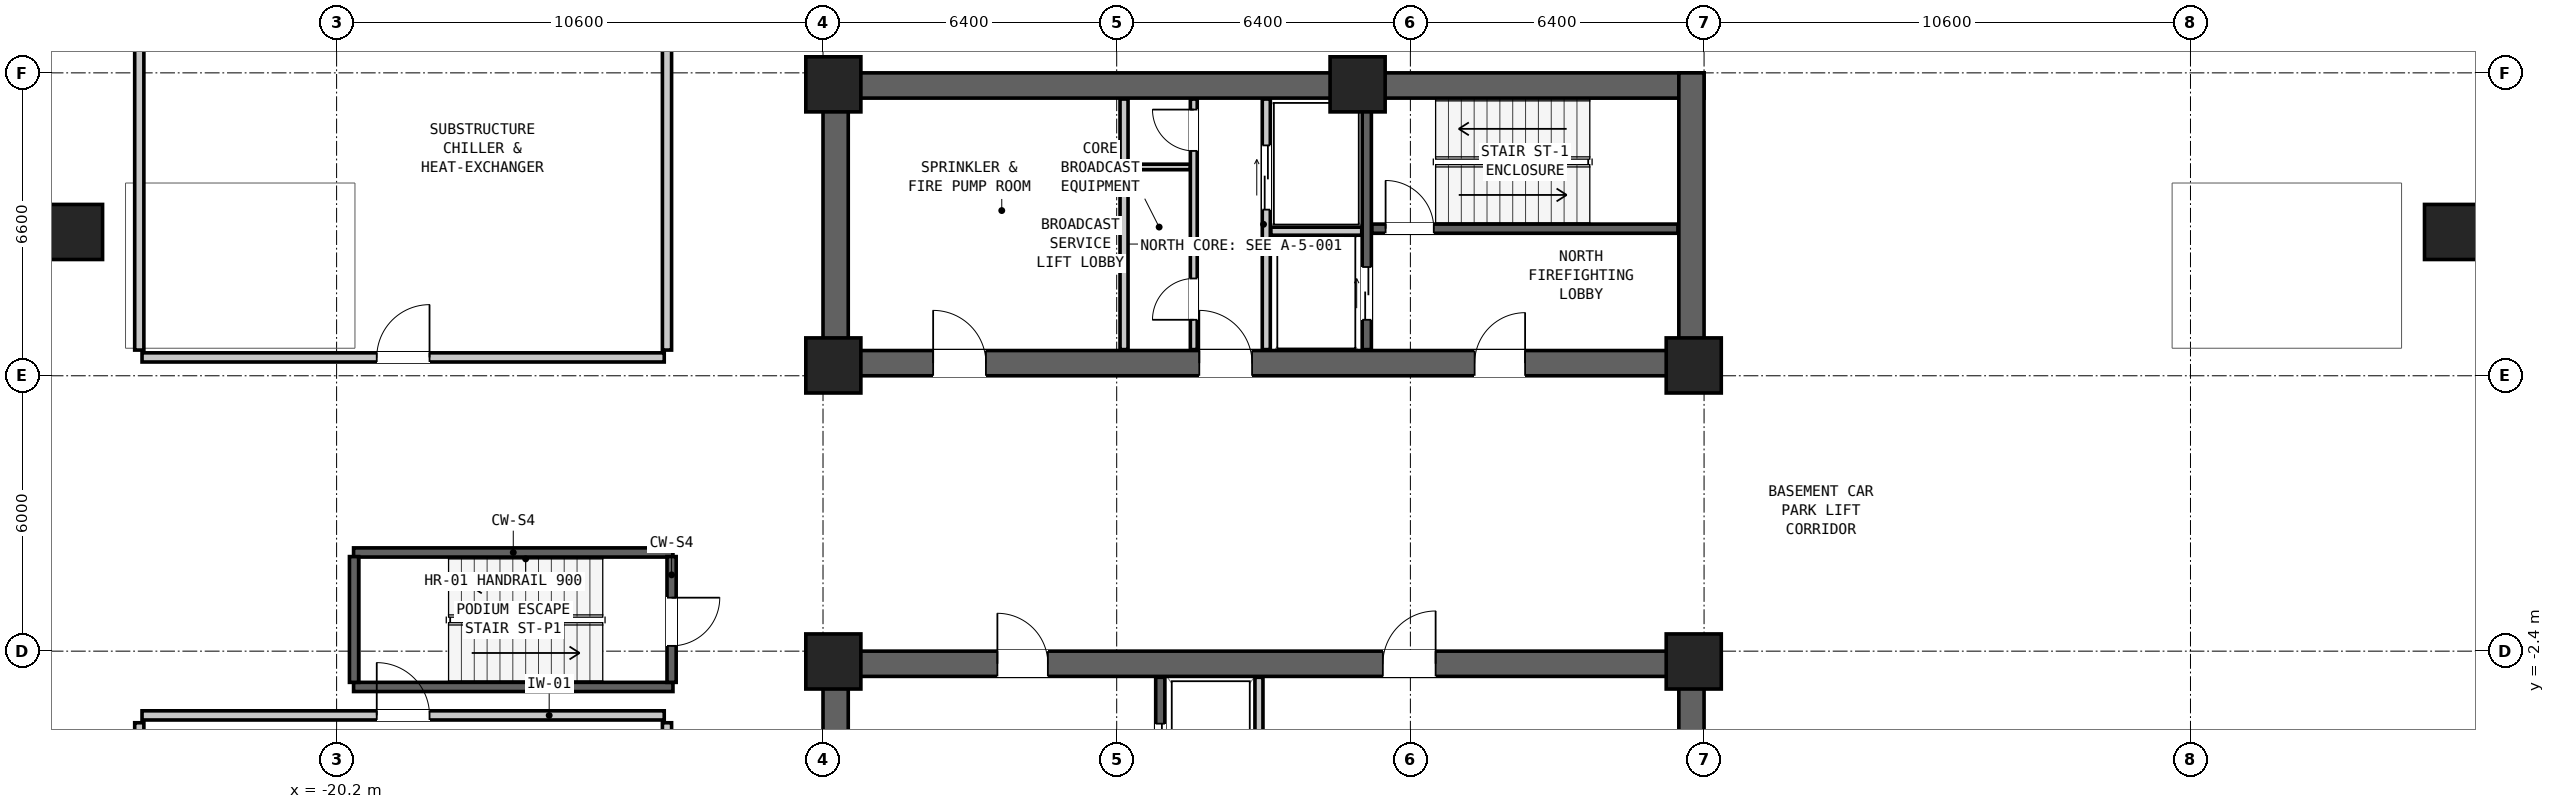
"""IFC4 building model, lengths in metres.
Left out: names, types, materials, properties, quantities, classifications, styles, units other than length and angle.
Written with IfcOpenShell. Run it as: python <this file> out.ifc"""

import sys

from ifc_helpers import new_model, si_unit, direction, frame, frame_2d, origin, origin_2d, place, context, subcontext, project, spatial, rectangle, extrude, element, fill, save


model = new_model("IFC4")
c1 = context("Model", 3, precision=1e-05, world=origin(), true_north=direction((0.0, 1.0)))
c2 = subcontext(c1, "Body", "Model", "MODEL_VIEW")
j1 = project(units=[si_unit("LENGTHUNIT", "METRE"), si_unit("PLANEANGLEUNIT", "RADIAN")], contexts=[c1])
p1 = place(None, origin())
s1 = spatial("IfcSite", under=j1, at=p1, CompositionType="ELEMENT")
p2 = place(p1, origin())
s2 = spatial("IfcBuilding", under=s1, at=p2, CompositionType="ELEMENT")
p3 = place(p2, frame((0.0, 0.0, -9.0)))
s3 = spatial("IfcBuildingStorey", under=s2, at=p3, CompositionType="ELEMENT", Elevation=-9.0)
p4 = place(p3, frame((-9.6, 9.925, 0.0), z_axis=(0.0, 0.0, 1.0), x_axis=(1.0, 0.0, 0.0)))
e1 = element("IfcWall", 1, at=p4, inside=s3, PredefinedType="SHEAR", context=c2, shape_type="SweptSolid", body=[
    extrude(rectangle(XDim=19.2, YDim=0.55, at=frame_2d((9.6, 0.0))), origin(), (0.0, 0.0, 1.0), 4.5),
])
p5 = place(p3, frame((-9.6, 3.875, 0.0), z_axis=(0.0, 0.0, 1.0), x_axis=(1.0, 0.0, 0.0)))
e2 = element("IfcWall", 2, at=p5, inside=s3, PredefinedType="SHEAR", context=c2, shape_type="SweptSolid", body=[
    extrude(rectangle(XDim=19.2, YDim=0.55, at=frame_2d((9.6, 0.0))), origin(), (0.0, 0.0, 1.0), 4.5),
])
p6 = place(p5, frame((14.2, 0.0, 0.0)))
e3 = element("IfcOpeningElement", 3, at=p6, cuts=e2, PredefinedType="OPENING", context=c2, shape_type="SweptSolid", body=[
    extrude(rectangle(XDim=1.1, YDim=2.08, at=frame_2d((0.55, 1.04))), frame((0.0, 0.287, 0.0), z_axis=(0.0, -1.0, 0.0), x_axis=(1.0, 0.0, 0.0)), (0.0, 0.0, 1.0), 0.574),
])
p7 = place(p5, frame((8.2, 0.0, 0.0)))
e4 = element("IfcOpeningElement", 4, at=p7, cuts=e2, PredefinedType="OPENING", context=c2, shape_type="SweptSolid", body=[
    extrude(rectangle(XDim=1.15, YDim=2.1, at=frame_2d((0.575, 1.05))), frame((0.0, 0.287, 0.0), z_axis=(0.0, -1.0, 0.0), x_axis=(1.0, 0.0, 0.0)), (0.0, 0.0, 1.0), 0.574),
])
p8 = place(p5, frame((2.4, 0.0, 0.0)))
e5 = element("IfcOpeningElement", 5, at=p8, cuts=e2, PredefinedType="OPENING", context=c2, shape_type="SweptSolid", body=[
    extrude(rectangle(XDim=1.15, YDim=2.1, at=frame_2d((0.575, 1.05))), frame((0.0, 0.287, 0.0), z_axis=(0.0, -1.0, 0.0), x_axis=(1.0, 0.0, 0.0)), (0.0, 0.0, 1.0), 0.574),
])
for number, where, z_axis, x_axis in (
    (6, (-9.325, 3.6, 0.0), (0.0, 0.0, 1.0), (0.0, 1.0, 0.0)),
    (7, (9.325, 3.6, 0.0), (0.0, 0.0, 1.0), (0.0, 1.0, 0.0)),
):
    element("IfcWall", number, at=place(p3, frame(where, z_axis=z_axis, x_axis=x_axis)), inside=s3, PredefinedType="SHEAR", context=c2, shape_type="SweptSolid", body=[
        extrude(rectangle(XDim=6.6, YDim=0.55, at=frame_2d((3.3, 0.0))), origin(), (0.0, 0.0, 1.0), 4.5),
    ])
p9 = place(p3, frame((-9.6, -2.675, 0.0), z_axis=(0.0, 0.0, 1.0), x_axis=(1.0, 0.0, 0.0)))
e8 = element("IfcWall", 8, at=p9, inside=s3, PredefinedType="SHEAR", context=c2, shape_type="SweptSolid", body=[
    extrude(rectangle(XDim=19.2, YDim=0.55, at=frame_2d((9.6, 0.0))), origin(), (0.0, 0.0, 1.0), 4.5),
])
p10 = place(p9, frame((3.8, 0.0, 0.0)))
e9 = element("IfcOpeningElement", 9, at=p10, cuts=e8, PredefinedType="OPENING", context=c2, shape_type="SweptSolid", body=[
    extrude(rectangle(XDim=1.1, YDim=2.08, at=frame_2d((0.55, 1.04))), frame((0.0, 0.287, 0.0), z_axis=(0.0, -1.0, 0.0), x_axis=(1.0, 0.0, 0.0)), (0.0, 0.0, 1.0), 0.574),
])
p11 = place(p9, frame((12.2, 0.0, 0.0)))
e10 = element("IfcOpeningElement", 10, at=p11, cuts=e8, PredefinedType="OPENING", context=c2, shape_type="SweptSolid", body=[
    extrude(rectangle(XDim=1.15, YDim=2.1, at=frame_2d((0.575, 1.05))), frame((0.0, 0.287, 0.0), z_axis=(0.0, -1.0, 0.0), x_axis=(1.0, 0.0, 0.0)), (0.0, 0.0, 1.0), 0.574),
])
for number, where, z_axis, x_axis in (
    (11, (-9.325, -9.0, 0.0), (0.0, 0.0, 1.0), (0.0, 1.0, 0.0)),
    (12, (9.325, -9.0, 0.0), (0.0, 0.0, 1.0), (0.0, 1.0, 0.0)),
):
    element("IfcWall", number, at=place(p3, frame(where, z_axis=z_axis, x_axis=x_axis)), inside=s3, PredefinedType="SHEAR", context=c2, shape_type="SweptSolid", body=[
        extrude(rectangle(XDim=6.6, YDim=0.55, at=frame_2d((3.3, 0.0))), origin(), (0.0, 0.0, 1.0), 4.5),
    ])
for number, where, z_axis, x_axis in (
    (13, (25.9, 6.733, 0.0), (0.0, 0.0, 1.0), (0.0, 1.0, 0.0)),
    (14, (-25.9, 6.733, 0.0), (0.0, 0.0, 1.0), (0.0, 1.0, 0.0)),
    (15, (-9.375, 9.95, 0.0), (0.0, 0.0, 1.0), (1.0, 0.0, 0.0)),
    (16, (2.05, 9.95, 0.0), (0.0, 0.0, 1.0), (1.0, 0.0, 0.0)),
    (17, (-9.375, 3.825, 0.0), (0.0, 0.0, 1.0), (1.0, 0.0, 0.0)),
    (18, (9.375, 3.825, 0.0), (0.0, 0.0, 1.0), (1.0, 0.0, 0.0)),
    (19, (-9.375, -2.625, 0.0), (0.0, 0.0, 1.0), (1.0, 0.0, 0.0)),
    (20, (9.375, -2.625, 0.0), (0.0, 0.0, 1.0), (1.0, 0.0, 0.0)),
):
    element("IfcColumn", number, at=place(p3, frame(where, z_axis=z_axis, x_axis=x_axis)), inside=s3, PredefinedType="COLUMN", context=c2, shape_type="SweptSolid", body=[
        extrude(rectangle(XDim=1.2, YDim=1.2, at=origin_2d()), origin(), (0.0, 0.0, 1.0), 4.5),
    ])
p12 = place(p3, frame((2.36, 6.805, 0.0), z_axis=(0.0, 0.0, 1.0), x_axis=(1.0, 0.0, 0.0)))
e21 = element("IfcWall", 21, at=p12, inside=s3, PredefinedType="SHEAR", context=c2, shape_type="SweptSolid", body=[
    extrude(rectangle(XDim=6.67, YDim=0.2, at=frame_2d((3.335, 0.0))), origin(), (0.0, 0.0, 1.0), 4.18),
])
p13 = place(p12, frame((0.3, 0.0, 0.0)))
e22 = element("IfcOpeningElement", 22, at=p13, cuts=e21, PredefinedType="OPENING", context=c2, shape_type="SweptSolid", body=[
    extrude(rectangle(XDim=1.05, YDim=2.08, at=frame_2d((0.525, 1.04))), frame((0.0, 0.112, 0.0), z_axis=(0.0, -1.0, 0.0), x_axis=(1.0, 0.0, 0.0)), (0.0, 0.0, 1.0), 0.224),
])
p14 = place(p3, frame((2.25, 4.17, 0.0), z_axis=(0.0, 0.0, 1.0), x_axis=(0.0, 1.0, 0.0)))
e23 = element("IfcWall", 23, at=p14, inside=s3, PredefinedType="SHEAR", context=c2, shape_type="SweptSolid", body=[
    extrude(rectangle(XDim=5.46, YDim=0.2, at=frame_2d((2.73, 0.0))), origin(), (0.0, 0.0, 1.0), 4.18),
])
p15 = place(p14, frame((0.65, 0.0, 0.0)))
e24 = element("IfcOpeningElement", 24, at=p15, cuts=e23, PredefinedType="OPENING", context=c2, shape_type="SweptSolid", body=[
    extrude(rectangle(XDim=1.15, YDim=2.08, at=frame_2d((0.575, 1.04))), frame((0.0, 0.112, 0.0), z_axis=(0.0, -1.0, 0.0), x_axis=(1.0, 0.0, 0.0)), (0.0, 0.0, 1.0), 0.224),
])
p16 = place(p3, frame((0.06, 4.17, 0.0), z_axis=(0.0, 0.0, 1.0), x_axis=(0.0, 1.0, 0.0)))
e25 = element("IfcWall", 25, at=p16, inside=s3, PredefinedType="PARTITIONING", context=c2, shape_type="SweptSolid", body=[
    extrude(rectangle(XDim=5.46, YDim=0.175, at=frame_2d((2.73, 0.0))), origin(), (0.0, 0.0, 1.0), 4.18),
])
p17 = place(p16, frame((3.05, 0.0, 0.0)))
e26 = element("IfcOpeningElement", 26, at=p17, cuts=e25, PredefinedType="OPENING", context=c2, shape_type="SweptSolid", body=[
    extrude(rectangle(XDim=1.4, YDim=2.12, at=frame_2d((0.7, 1.06))), frame((0.0, 0.1, 0.0), z_axis=(0.0, -1.0, 0.0), x_axis=(1.0, 0.0, 0.0)), (0.0, 0.0, 1.0), 0.199),
])
p18 = place(p3, frame((0.16, 6.75, 0.0), z_axis=(0.0, 0.0, 1.0), x_axis=(1.0, 0.0, 0.0)))
e27 = element("IfcWall", 27, at=p18, inside=s3, PredefinedType="PARTITIONING", context=c2, shape_type="SweptSolid", body=[
    extrude(rectangle(XDim=1.98, YDim=0.175, at=frame_2d((0.99, 0.0))), origin(), (0.0, 0.0, 1.0), 4.18),
])
p19 = place(p3, frame((-3.04, 4.17, 0.0), z_axis=(0.0, 0.0, 1.0), x_axis=(0.0, 1.0, 0.0)))
e28 = element("IfcWall", 28, at=p19, inside=s3, PredefinedType="PARTITIONING", context=c2, shape_type="SweptSolid", body=[
    extrude(rectangle(XDim=5.46, YDim=0.175, at=frame_2d((2.73, 0.0))), origin(), (0.0, 0.0, 1.0), 4.18),
])
p20 = place(p3, frame((-1.52, 4.17, 0.0), z_axis=(0.0, 0.0, 1.0), x_axis=(0.0, 1.0, 0.0)))
e29 = element("IfcWall", 29, at=p20, inside=s3, PredefinedType="PARTITIONING", context=c2, shape_type="SweptSolid", body=[
    extrude(rectangle(XDim=5.46, YDim=0.15, at=frame_2d((2.73, 0.0))), origin(), (0.0, 0.0, 1.0), 4.18),
])
p21 = place(p20, frame((4.33, 0.0, 0.0)))
e30 = element("IfcOpeningElement", 30, at=p21, cuts=e29, PredefinedType="OPENING", context=c2, shape_type="SweptSolid", body=[
    extrude(rectangle(XDim=0.9, YDim=2.05, at=frame_2d((0.45, 1.025))), frame((0.0, 0.087, 0.0), z_axis=(0.0, -1.0, 0.0), x_axis=(1.0, 0.0, 0.0)), (0.0, 0.0, 1.0), 0.174),
])
p22 = place(p20, frame((0.65, 0.0, 0.0)))
e31 = element("IfcOpeningElement", 31, at=p22, cuts=e29, PredefinedType="OPENING", context=c2, shape_type="SweptSolid", body=[
    extrude(rectangle(XDim=0.9, YDim=2.05, at=frame_2d((0.45, 1.025))), frame((0.0, 0.087, 0.0), z_axis=(0.0, -1.0, 0.0), x_axis=(1.0, 0.0, 0.0)), (0.0, 0.0, 1.0), 0.174),
])
p23 = place(p3, frame((-2.96, 8.15, 0.0), z_axis=(0.0, 0.0, 1.0), x_axis=(1.0, 0.0, 0.0)))
e32 = element("IfcWall", 32, at=p23, inside=s3, PredefinedType="PARTITIONING", context=c2, shape_type="SweptSolid", body=[
    extrude(rectangle(XDim=1.36, YDim=0.12, at=frame_2d((0.68, 0.0))), origin(), (0.0, 0.0, 1.0), 4.18),
])
p24 = place(p3, frame((-2.25, -8.43, 0.0), z_axis=(0.0, 0.0, 1.0), x_axis=(0.0, 1.0, 0.0)))
e33 = element("IfcWall", 33, at=p24, inside=s3, PredefinedType="SHEAR", context=c2, shape_type="SweptSolid", body=[
    extrude(rectangle(XDim=5.46, YDim=0.2, at=frame_2d((2.73, 0.0))), origin(), (0.0, 0.0, 1.0), 4.18),
])
p25 = place(p24, frame((3.3, 0.0, 0.0)))
e34 = element("IfcOpeningElement", 34, at=p25, cuts=e33, PredefinedType="OPENING", context=c2, shape_type="SweptSolid", body=[
    extrude(rectangle(XDim=1.15, YDim=2.08, at=frame_2d((0.575, 1.04))), frame((0.0, 0.112, 0.0), z_axis=(0.0, -1.0, 0.0), x_axis=(1.0, 0.0, 0.0)), (0.0, 0.0, 1.0), 0.224),
])
p26 = place(p3, frame((-0.1, -8.43, 0.0), z_axis=(0.0, 0.0, 1.0), x_axis=(0.0, 1.0, 0.0)))
e35 = element("IfcWall", 35, at=p26, inside=s3, PredefinedType="PARTITIONING", context=c2, shape_type="SweptSolid", body=[
    extrude(rectangle(XDim=5.46, YDim=0.175, at=frame_2d((2.73, 0.0))), origin(), (0.0, 0.0, 1.0), 4.18),
])
p27 = place(p26, frame((0.45, 0.0, 0.0)))
e36 = element("IfcOpeningElement", 36, at=p27, cuts=e35, PredefinedType="OPENING", context=c2, shape_type="SweptSolid", body=[
    extrude(rectangle(XDim=0.9, YDim=2.05, at=frame_2d((0.45, 1.025))), frame((0.0, 0.1, 0.0), z_axis=(0.0, -1.0, 0.0), x_axis=(1.0, 0.0, 0.0)), (0.0, 0.0, 1.0), 0.199),
])
for number, where, z_axis, x_axis in (
    (37, (-19.83, -0.25, 0.0), (0.0, 0.0, 1.0), (1.0, 0.0, 0.0)),
    (38, (-19.83, -3.18, 0.0), (0.0, 0.0, 1.0), (1.0, 0.0, 0.0)),
):
    element("IfcWall", number, at=place(p3, frame(where, z_axis=z_axis, x_axis=x_axis)), inside=s3, PredefinedType="SHEAR", context=c2, shape_type="SweptSolid", body=[
        extrude(rectangle(XDim=6.96, YDim=0.2, at=frame_2d((3.48, 0.0))), origin(), (0.0, 0.0, 1.0), 4.18),
    ])
p28 = place(p3, frame((-12.9, -0.34, 0.0), z_axis=(0.0, 0.0, 1.0), x_axis=(0.0, -1.0, 0.0)))
e39 = element("IfcWall", 39, at=p28, inside=s3, PredefinedType="SHEAR", context=c2, shape_type="SweptSolid", body=[
    extrude(rectangle(XDim=2.74, YDim=0.2, at=frame_2d((1.37, 0.0))), origin(), (0.0, 0.0, 1.0), 4.18),
])
p29 = place(p28, frame((0.895, 0.0, 0.0)))
e40 = element("IfcOpeningElement", 40, at=p29, cuts=e39, PredefinedType="OPENING", context=c2, shape_type="SweptSolid", body=[
    extrude(rectangle(XDim=1.05, YDim=2.08, at=frame_2d((0.525, 1.04))), frame((0.0, 0.112, 0.0), z_axis=(0.0, -1.0, 0.0), x_axis=(1.0, 0.0, 0.0)), (0.0, 0.0, 1.0), 0.224),
])
p30 = place(p3, frame((-19.82, -3.08, 0.0), z_axis=(0.0, 0.0, 1.0), x_axis=(0.0, 1.0, 0.0)))
e41 = element("IfcWall", 41, at=p30, inside=s3, PredefinedType="SHEAR", context=c2, shape_type="SweptSolid", body=[
    extrude(rectangle(XDim=2.74, YDim=0.2, at=frame_2d((1.37, 0.0))), origin(), (0.0, 0.0, 1.0), 4.18),
])
p31 = place(p3, frame((-24.44, -3.8, 0.0), z_axis=(0.0, 0.0, 1.0), x_axis=(1.0, 0.0, 0.0)))
e42 = element("IfcWall", 42, at=p31, inside=s3, PredefinedType="PARTITIONING", context=c2, shape_type="SweptSolid", body=[
    extrude(rectangle(XDim=11.38, YDim=0.2, at=frame_2d((5.69, 0.0))), origin(), (0.0, 0.0, 1.0), 4.18),
])
p32 = place(p31, frame((5.115, 0.0, 0.0)))
e43 = element("IfcOpeningElement", 43, at=p32, cuts=e42, PredefinedType="OPENING", context=c2, shape_type="SweptSolid", body=[
    extrude(rectangle(XDim=1.15, YDim=2.1, at=frame_2d((0.575, 1.05))), frame((0.0, 0.112, 0.0), z_axis=(0.0, -1.0, 0.0), x_axis=(1.0, 0.0, 0.0)), (0.0, 0.0, 1.0), 0.224),
])
for number, where, z_axis, x_axis in (
    (44, (-24.5, -12.34, 0.0), (0.0, 0.0, 1.0), (0.0, 1.0, 0.0)),
    (45, (-13.0, -12.34, 0.0), (0.0, 0.0, 1.0), (0.0, 1.0, 0.0)),
):
    element("IfcWall", number, at=place(p3, frame(where, z_axis=z_axis, x_axis=x_axis)), inside=s3, PredefinedType="PARTITIONING", context=c2, shape_type="SweptSolid", body=[
        extrude(rectangle(XDim=8.38, YDim=0.2, at=frame_2d((4.19, 0.0))), origin(), (0.0, 0.0, 1.0), 4.18),
    ])
p33 = place(p3, frame((-24.44, 4.0, 0.0), z_axis=(0.0, 0.0, 1.0), x_axis=(1.0, 0.0, 0.0)))
e46 = element("IfcWall", 46, at=p33, inside=s3, PredefinedType="PARTITIONING", context=c2, shape_type="SweptSolid", body=[
    extrude(rectangle(XDim=11.38, YDim=0.2, at=frame_2d((5.69, 0.0))), origin(), (0.0, 0.0, 1.0), 3.042),
])
p34 = place(p33, frame((5.115, 0.0, 0.0)))
e47 = element("IfcOpeningElement", 47, at=p34, cuts=e46, PredefinedType="OPENING", context=c2, shape_type="SweptSolid", body=[
    extrude(rectangle(XDim=1.15, YDim=2.1, at=frame_2d((0.575, 1.05))), frame((0.0, 0.112, 0.0), z_axis=(0.0, -1.0, 0.0), x_axis=(1.0, 0.0, 0.0)), (0.0, 0.0, 1.0), 0.224),
])
for number, where, z_axis, x_axis in (
    (48, (-24.5, 4.16, 0.0), (0.0, 0.0, 1.0), (0.0, 1.0, 0.0)),
    (49, (-13.0, 4.16, 0.0), (0.0, 0.0, 1.0), (0.0, 1.0, 0.0)),
):
    element("IfcWall", number, at=place(p3, frame(where, z_axis=z_axis, x_axis=x_axis)), inside=s3, PredefinedType="PARTITIONING", context=c2, shape_type="SweptSolid", body=[
        extrude(rectangle(XDim=8.18, YDim=0.2, at=frame_2d((4.09, 0.0))), origin(), (0.0, 0.0, 1.0), 4.18),
    ])
p35 = place(p13, origin())
e50 = element("IfcDoor", 50, at=p35, inside=s3, OperationType="SINGLE_SWING_LEFT", PredefinedType="DOOR", context=c2, shape_type="SweptSolid", body=[
    extrude(rectangle(XDim=1.05, YDim=2.08, at=frame_2d((0.525, 1.04))), frame((0.0, 0.025, 0.0), z_axis=(0.0, -1.0, 0.0), x_axis=(1.0, 0.0, 0.0)), (0.0, 0.0, 1.0), 0.05),
])
fill(e22, e50)
p36 = place(p6, origin())
e51 = element("IfcDoor", 51, at=p36, inside=s3, OperationType="SINGLE_SWING_RIGHT", PredefinedType="DOOR", context=c2, shape_type="SweptSolid", body=[
    extrude(rectangle(XDim=1.1, YDim=2.08, at=frame_2d((0.55, 1.04))), frame((0.0, 0.025, 0.0), z_axis=(0.0, -1.0, 0.0), x_axis=(1.0, 0.0, 0.0)), (0.0, 0.0, 1.0), 0.05),
])
fill(e3, e51)
p37 = place(p15, origin())
e52 = element("IfcDoor", 52, at=p37, inside=s3, OperationType="DOUBLE_DOOR_SLIDING", PredefinedType="DOOR", context=c2, shape_type="SweptSolid", body=[
    extrude(rectangle(XDim=1.15, YDim=2.08, at=frame_2d((0.575, 1.04))), frame((0.0, 0.025, 0.0), z_axis=(0.0, -1.0, 0.0), x_axis=(1.0, 0.0, 0.0)), (0.0, 0.0, 1.0), 0.05),
])
fill(e24, e52)
p38 = place(p17, origin())
e53 = element("IfcDoor", 53, at=p38, inside=s3, OperationType="DOUBLE_DOOR_SLIDING", PredefinedType="DOOR", context=c2, shape_type="SweptSolid", body=[
    extrude(rectangle(XDim=1.4, YDim=2.12, at=frame_2d((0.7, 1.06))), frame((0.0, 0.025, 0.0), z_axis=(0.0, -1.0, 0.0), x_axis=(1.0, 0.0, 0.0)), (0.0, 0.0, 1.0), 0.05),
])
fill(e26, e53)
p39 = place(p7, origin())
e54 = element("IfcDoor", 54, at=p39, inside=s3, OperationType="SINGLE_SWING_LEFT", PredefinedType="DOOR", context=c2, shape_type="SweptSolid", body=[
    extrude(rectangle(XDim=1.15, YDim=2.1, at=frame_2d((0.575, 1.05))), frame((0.0, 0.025, 0.0), z_axis=(0.0, -1.0, 0.0), x_axis=(1.0, 0.0, 0.0)), (0.0, 0.0, 1.0), 0.05),
])
fill(e4, e54)
p40 = place(p21, origin())
e55 = element("IfcDoor", 55, at=p40, inside=s3, OperationType="SINGLE_SWING_RIGHT", PredefinedType="DOOR", context=c2, shape_type="SweptSolid", body=[
    extrude(rectangle(XDim=0.9, YDim=2.05, at=frame_2d((0.45, 1.025))), frame((0.0, 0.025, 0.0), z_axis=(0.0, -1.0, 0.0), x_axis=(1.0, 0.0, 0.0)), (0.0, 0.0, 1.0), 0.05),
])
fill(e30, e55)
p41 = place(p22, origin())
e56 = element("IfcDoor", 56, at=p41, inside=s3, OperationType="SINGLE_SWING_LEFT", PredefinedType="DOOR", context=c2, shape_type="SweptSolid", body=[
    extrude(rectangle(XDim=0.9, YDim=2.05, at=frame_2d((0.45, 1.025))), frame((0.0, 0.025, 0.0), z_axis=(0.0, -1.0, 0.0), x_axis=(1.0, 0.0, 0.0)), (0.0, 0.0, 1.0), 0.05),
])
fill(e31, e56)
p42 = place(p8, origin())
e57 = element("IfcDoor", 57, at=p42, inside=s3, OperationType="SINGLE_SWING_LEFT", PredefinedType="DOOR", context=c2, shape_type="SweptSolid", body=[
    extrude(rectangle(XDim=1.15, YDim=2.1, at=frame_2d((0.575, 1.05))), frame((0.0, 0.025, 0.0), z_axis=(0.0, -1.0, 0.0), x_axis=(1.0, 0.0, 0.0)), (0.0, 0.0, 1.0), 0.05),
])
fill(e5, e57)
p43 = place(p10, origin())
e58 = element("IfcDoor", 58, at=p43, inside=s3, OperationType="SINGLE_SWING_LEFT", PredefinedType="DOOR", context=c2, shape_type="SweptSolid", body=[
    extrude(rectangle(XDim=1.1, YDim=2.08, at=frame_2d((0.55, 1.04))), frame((0.0, 0.025, 0.0), z_axis=(0.0, -1.0, 0.0), x_axis=(1.0, 0.0, 0.0)), (0.0, 0.0, 1.0), 0.05),
])
fill(e9, e58)
p44 = place(p25, origin())
e59 = element("IfcDoor", 59, at=p44, inside=s3, OperationType="DOUBLE_DOOR_SLIDING", PredefinedType="DOOR", context=c2, shape_type="SweptSolid", body=[
    extrude(rectangle(XDim=1.15, YDim=2.08, at=frame_2d((0.575, 1.04))), frame((0.0, 0.025, 0.0), z_axis=(0.0, -1.0, 0.0), x_axis=(1.0, 0.0, 0.0)), (0.0, 0.0, 1.0), 0.05),
])
fill(e34, e59)
p45 = place(p11, origin())
e60 = element("IfcDoor", 60, at=p45, inside=s3, OperationType="SINGLE_SWING_RIGHT", PredefinedType="DOOR", context=c2, shape_type="SweptSolid", body=[
    extrude(rectangle(XDim=1.15, YDim=2.1, at=frame_2d((0.575, 1.05))), frame((0.0, 0.025, 0.0), z_axis=(0.0, -1.0, 0.0), x_axis=(1.0, 0.0, 0.0)), (0.0, 0.0, 1.0), 0.05),
])
fill(e10, e60)
p46 = place(p29, origin())
e61 = element("IfcDoor", 61, at=p46, inside=s3, OperationType="SINGLE_SWING_LEFT", PredefinedType="DOOR", context=c2, shape_type="SweptSolid", body=[
    extrude(rectangle(XDim=1.05, YDim=2.08, at=frame_2d((0.525, 1.04))), frame((0.0, 0.025, 0.0), z_axis=(0.0, -1.0, 0.0), x_axis=(1.0, 0.0, 0.0)), (0.0, 0.0, 1.0), 0.05),
])
fill(e40, e61)
p47 = place(p32, origin())
e62 = element("IfcDoor", 62, at=p47, inside=s3, OperationType="SINGLE_SWING_LEFT", PredefinedType="DOOR", context=c2, shape_type="SweptSolid", body=[
    extrude(rectangle(XDim=1.15, YDim=2.1, at=frame_2d((0.575, 1.05))), frame((0.0, 0.025, 0.0), z_axis=(0.0, -1.0, 0.0), x_axis=(1.0, 0.0, 0.0)), (0.0, 0.0, 1.0), 0.05),
])
fill(e43, e62)
p48 = place(p34, origin())
e63 = element("IfcDoor", 63, at=p48, inside=s3, OperationType="SINGLE_SWING_RIGHT", PredefinedType="DOOR", context=c2, shape_type="SweptSolid", body=[
    extrude(rectangle(XDim=1.15, YDim=2.1, at=frame_2d((0.575, 1.05))), frame((0.0, 0.025, 0.0), z_axis=(0.0, -1.0, 0.0), x_axis=(1.0, 0.0, 0.0)), (0.0, 0.0, 1.0), 0.05),
])
fill(e47, e63)
save(model, sys.argv[1])
